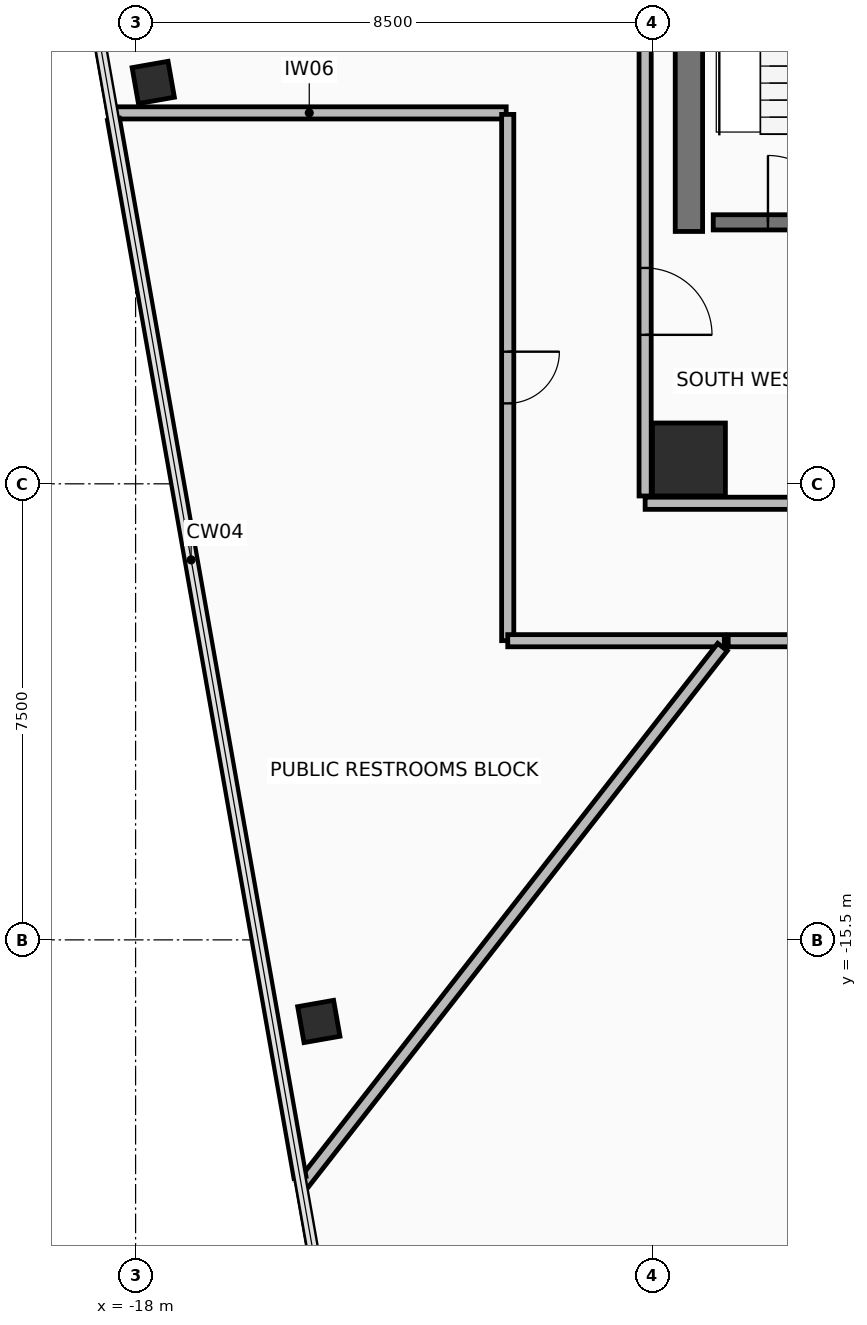
"""IFC4 building model, lengths in metres.
Left out: names, types, materials, properties, quantities, classifications, styles, units other than length and angle.
Written with IfcOpenShell. Run it as: python <this file> out.ifc"""

import sys

from ifc_helpers import new_model, si_unit, direction, frame, frame_2d, origin, origin_2d, place, context, subcontext, project, spatial, rectangle, hollow_rectangle, extrude, element, fill, save


model = new_model("IFC4")
c1 = context("Model", 3, precision=1e-05, world=origin(), true_north=direction((0.0, 1.0)))
c2 = subcontext(c1, "Body", "Model", "MODEL_VIEW")
j1 = project(units=[si_unit("LENGTHUNIT", "METRE"), si_unit("PLANEANGLEUNIT", "RADIAN")], contexts=[c1])
p1 = place(None, origin())
s1 = spatial("IfcSite", under=j1, at=p1, CompositionType="ELEMENT")
p2 = place(p1, origin())
s2 = spatial("IfcBuilding", under=s1, at=p2, CompositionType="ELEMENT")
p3 = place(p2, frame((0.0, 0.0, 188.5)))
s3 = spatial("IfcBuildingStorey", under=s2, at=p3, CompositionType="ELEMENT", Elevation=188.5)
p4 = place(p3, frame((-8.9, -7.6, 0.0), z_axis=(0.0, 0.0, 1.0), x_axis=(1.0, 0.0, 0.0)))
e1 = element("IfcColumn", 1, at=p4, inside=s3, PredefinedType="COLUMN", context=c2, shape_type="SweptSolid", body=[
    extrude(rectangle(XDim=1.2, YDim=1.2, at=origin_2d()), origin(), (0.0, 0.0, 1.0), 3.6),
])
for number, where, z_axis, x_axis in (
    (2, (-17.71, -1.399, 0.0), (0.0, 0.0, 1.0), (-0.174, 0.985, 0.0)),
    (3, (-14.987, -16.842, 0.0), (0.0, 0.0, 1.0), (-0.174, 0.985, 0.0)),
):
    element("IfcColumn", number, at=place(p3, frame(where, z_axis=z_axis, x_axis=x_axis)), inside=s3, PredefinedType="COLUMN", context=c2, shape_type="SweptSolid", body=[
        extrude(hollow_rectangle(XDim=0.6, YDim=0.6, WallThickness=0.036, at=origin_2d()), origin(), (0.0, 0.0, 1.0), 3.6),
    ])
p5 = place(p3, frame((-8.9, -3.85, 0.0), z_axis=(0.0, 0.0, 1.0), x_axis=(0.0, 1.0, 0.0)))
e4 = element("IfcWall", 4, at=p5, inside=s3, PredefinedType="SHEAR", context=c2, shape_type="SweptSolid", body=[
    extrude(rectangle(XDim=10.7, YDim=0.45, at=frame_2d((5.35, 0.0))), origin(), (0.0, 0.0, 1.0), 3.42),
])
p6 = place(p3, frame((-9.62, -8.32, 0.0), z_axis=(0.0, 0.0, 1.0), x_axis=(1.0, 0.0, 0.0)))
e5 = element("IfcWall", 5, at=p6, inside=s3, PredefinedType="PARTITIONING", context=c2, shape_type="SweptSolid", body=[
    extrude(rectangle(XDim=19.24, YDim=0.2, at=frame_2d((9.62, 0.0))), origin(), (0.0, 0.0, 1.0), 2.865),
])
p7 = place(p6, frame((7.37, 0.0, 0.0)))
e6 = element("IfcOpeningElement", 6, at=p7, cuts=e5, PredefinedType="OPENING", context=c2, shape_type="SweptSolid", body=[
    extrude(rectangle(XDim=0.9, YDim=2.1, at=frame_2d((0.45, 1.05))), frame((0.0, 0.11, 0.0), z_axis=(0.0, -1.0, 0.0), x_axis=(1.0, 0.0, 0.0)), (0.0, 0.0, 1.0), 0.22),
])
p8 = place(p6, frame((10.77, 0.0, 0.0)))
e7 = element("IfcOpeningElement", 7, at=p8, cuts=e5, PredefinedType="OPENING", context=c2, shape_type="SweptSolid", body=[
    extrude(rectangle(XDim=0.9, YDim=2.1, at=frame_2d((0.45, 1.05))), frame((0.0, 0.11, 0.0), z_axis=(0.0, -1.0, 0.0), x_axis=(1.0, 0.0, 0.0)), (0.0, 0.0, 1.0), 0.22),
])
p9 = place(p6, frame((13.97, 0.0, 0.0)))
e8 = element("IfcOpeningElement", 8, at=p9, cuts=e5, PredefinedType="OPENING", context=c2, shape_type="SweptSolid", body=[
    extrude(rectangle(XDim=0.9, YDim=2.1, at=frame_2d((0.45, 1.05))), frame((0.0, 0.11, 0.0), z_axis=(0.0, -1.0, 0.0), x_axis=(1.0, 0.0, 0.0)), (0.0, 0.0, 1.0), 0.22),
])
p10 = place(p3, frame((-9.62, 8.2, 0.0), z_axis=(0.0, 0.0, 1.0), x_axis=(0.0, -1.0, 0.0)))
e9 = element("IfcWall", 9, at=p10, inside=s3, PredefinedType="PARTITIONING", context=c2, shape_type="SweptSolid", body=[
    extrude(rectangle(XDim=16.4, YDim=0.2, at=frame_2d((8.2, 0.0))), origin(), (0.0, 0.0, 1.0), 2.765),
])
p11 = place(p10, frame((12.65, 0.0, 0.0)))
e10 = element("IfcOpeningElement", 10, at=p11, cuts=e9, PredefinedType="OPENING", context=c2, shape_type="SweptSolid", body=[
    extrude(rectangle(XDim=1.1, YDim=2.15, at=frame_2d((0.55, 1.075))), frame((0.0, 0.11, 0.0), z_axis=(0.0, -1.0, 0.0), x_axis=(1.0, 0.0, 0.0)), (0.0, 0.0, 1.0), 0.22),
])
p12 = place(p3, frame((-8.5, -3.7, 0.0), z_axis=(0.0, 0.0, 1.0), x_axis=(1.0, 0.0, 0.0)))
e11 = element("IfcWall", 11, at=p12, inside=s3, PredefinedType="SHEAR", context=c2, shape_type="SweptSolid", body=[
    extrude(rectangle(XDim=2.95, YDim=0.25, at=frame_2d((1.475, 0.0))), origin(), (0.0, 0.0, 1.0), 3.42),
])
p13 = place(p12, frame((0.9, 0.0, 0.0)))
e12 = element("IfcOpeningElement", 12, at=p13, cuts=e11, PredefinedType="OPENING", context=c2, shape_type="SweptSolid", body=[
    extrude(rectangle(XDim=1.1, YDim=2.15, at=frame_2d((0.55, 1.075))), frame((0.0, 0.135, 0.0), z_axis=(0.0, -1.0, 0.0), x_axis=(1.0, 0.0, 0.0)), (0.0, 0.0, 1.0), 0.27),
])
p14 = place(p3, frame((-18.383, -1.9, 0.0), z_axis=(0.0, 0.0, 1.0), x_axis=(1.0, 0.0, 0.0)))
e13 = element("IfcWall", 13, at=p14, inside=s3, PredefinedType="PARTITIONING", context=c2, shape_type="SweptSolid", body=[
    extrude(rectangle(XDim=6.478, YDim=0.2, at=frame_2d((3.239, 0.0))), origin(), (0.0, 0.0, 1.0), 2.715),
])
p15 = place(p3, frame((-11.88, -1.925, 0.0), z_axis=(0.0, 0.0, 1.0), x_axis=(0.0, -1.0, 0.0)))
e14 = element("IfcWall", 14, at=p15, inside=s3, PredefinedType="PARTITIONING", context=c2, shape_type="SweptSolid", body=[
    extrude(rectangle(XDim=8.654, YDim=0.2, at=frame_2d((4.327, 0.0))), origin(), (0.0, 0.0, 1.0), 2.865),
])
p16 = place(p15, frame((3.902, 0.0, 0.0)))
e15 = element("IfcOpeningElement", 15, at=p16, cuts=e14, PredefinedType="OPENING", context=c2, shape_type="SweptSolid", body=[
    extrude(rectangle(XDim=0.85, YDim=2.1, at=frame_2d((0.425, 1.05))), frame((0.0, 0.11, 0.0), z_axis=(0.0, -1.0, 0.0), x_axis=(1.0, 0.0, 0.0)), (0.0, 0.0, 1.0), 0.22),
])
p17 = place(p3, frame((-11.879, -10.58, 0.0), z_axis=(0.0, 0.0, 1.0), x_axis=(1.0, 0.0, 0.0)))
e16 = element("IfcWall", 16, at=p17, inside=s3, PredefinedType="PARTITIONING", context=c2, shape_type="SweptSolid", body=[
    extrude(rectangle(XDim=3.562, YDim=0.2, at=frame_2d((1.781, 0.0))), origin(), (0.0, 0.0, 1.0), 2.865),
])
p18 = place(p3, frame((-8.348, -10.685, 0.0), z_axis=(0.0, 0.0, 1.0), x_axis=(-0.615667634963, -0.788005941132, 0.0)))
e17 = element("IfcWall", 17, at=p18, inside=s3, PredefinedType="PARTITIONING", context=c2, shape_type="SweptSolid", body=[
    extrude(rectangle(XDim=11.245, YDim=0.2, at=frame_2d((5.623, 0.0))), origin(), (0.0, 0.0, 1.0), 2.715),
])
p19 = place(p3, frame((-15.296, -19.407, 0.0), z_axis=(0.0, 0.0, 1.0), x_axis=(-0.17365370915, 0.984806777646, 0.0)))
e18 = element("IfcWall", 18, at=p19, inside=s3, PredefinedType="PARTITIONING", context=c2, shape_type="SweptSolid", body=[
    extrude(rectangle(XDim=17.671, YDim=0.2, at=frame_2d((8.835, 0.0))), origin(), (0.0, 0.0, 1.0), 3.42),
])
p20 = place(p3, frame((-8.254, -10.58, 0.0), z_axis=(0.0, 0.0, 1.0), x_axis=(1.0, 0.0, 0.0)))
e19 = element("IfcWall", 19, at=p20, inside=s3, PredefinedType="PARTITIONING", context=c2, shape_type="SweptSolid", body=[
    extrude(rectangle(XDim=11.269, YDim=0.2, at=frame_2d((5.634, 0.0))), origin(), (0.0, 0.0, 1.0), 3.42),
])
p21 = place(p20, frame((5.134, 0.0, 0.0)))
e20 = element("IfcOpeningElement", 20, at=p21, cuts=e19, PredefinedType="OPENING", context=c2, shape_type="SweptSolid", body=[
    extrude(rectangle(XDim=1.0, YDim=2.15, at=frame_2d((0.5, 1.075))), frame((0.0, 0.11, 0.0), z_axis=(0.0, -1.0, 0.0), x_axis=(1.0, 0.0, 0.0)), (0.0, 0.0, 1.0), 0.22),
])
p22 = place(p11, frame((1.1, 0.0, 0.0), z_axis=(0.0, 0.0, 1.0), x_axis=(-1.0, 0.0, 0.0)))
e21 = element("IfcDoor", 21, at=p22, inside=s3, OperationType="SINGLE_SWING_LEFT", PredefinedType="DOOR", context=c2, shape_type="SweptSolid", body=[
    extrude(rectangle(XDim=1.1, YDim=2.15, at=frame_2d((0.55, 1.075))), frame((0.0, 0.025, 0.0), z_axis=(0.0, -1.0, 0.0), x_axis=(1.0, 0.0, 0.0)), (0.0, 0.0, 1.0), 0.05),
])
fill(e10, e21)
p23 = place(p13, origin())
e22 = element("IfcDoor", 22, at=p23, inside=s3, OperationType="SINGLE_SWING_LEFT", PredefinedType="DOOR", context=c2, shape_type="SweptSolid", body=[
    extrude(rectangle(XDim=1.1, YDim=2.15, at=frame_2d((0.55, 1.075))), frame((0.0, 0.025, 0.0), z_axis=(0.0, -1.0, 0.0), x_axis=(1.0, 0.0, 0.0)), (0.0, 0.0, 1.0), 0.05),
])
fill(e12, e22)
p24 = place(p16, origin())
e23 = element("IfcDoor", 23, at=p24, inside=s3, OperationType="SINGLE_SWING_RIGHT", PredefinedType="DOOR", context=c2, shape_type="SweptSolid", body=[
    extrude(rectangle(XDim=0.85, YDim=2.1, at=frame_2d((0.425, 1.05))), frame((0.0, 0.025, 0.0), z_axis=(0.0, -1.0, 0.0), x_axis=(1.0, 0.0, 0.0)), (0.0, 0.0, 1.0), 0.05),
])
fill(e15, e23)
save(model, sys.argv[1])
